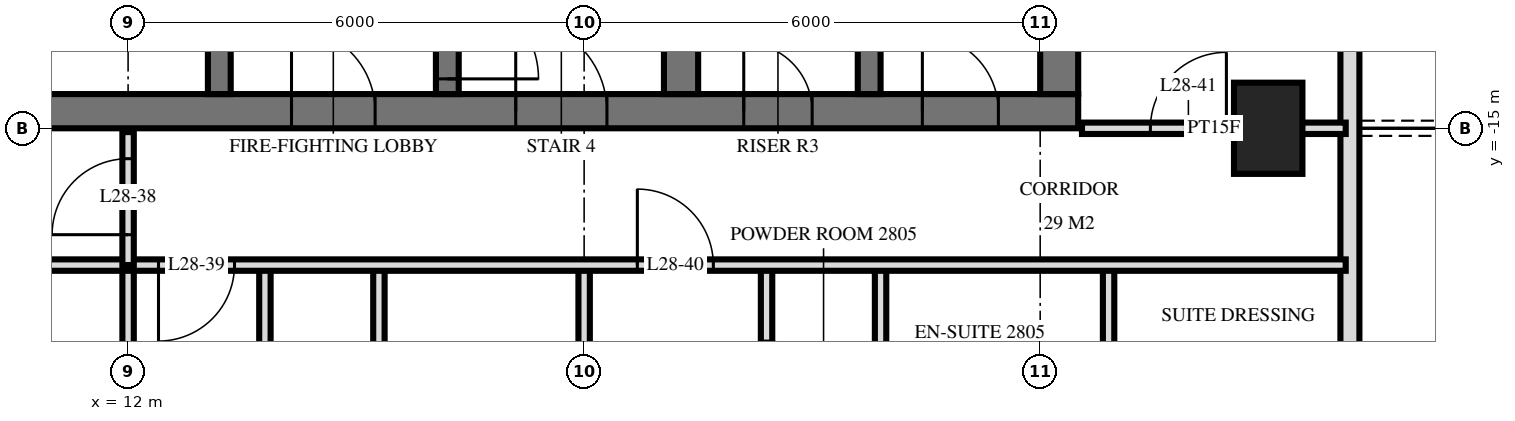
"""IFC4 building model, lengths in metres.
Left out: names, types, materials, properties, quantities, classifications, styles, units other than length and angle.
Written with IfcOpenShell. Run it as: python <this file> out.ifc"""

import sys

from ifc_helpers import new_model, si_unit, direction, frame, frame_2d, origin, origin_2d, place, context, subcontext, project, spatial, rectangle, extrude, element, fill, save


model = new_model("IFC4")
c1 = context("Model", 3, precision=1e-05, world=origin(), true_north=direction((0.0, 1.0)))
c2 = subcontext(c1, "Body", "Model", "MODEL_VIEW")
j1 = project(units=[si_unit("LENGTHUNIT", "METRE"), si_unit("PLANEANGLEUNIT", "RADIAN")], contexts=[c1])
p1 = place(None, origin())
s1 = spatial("IfcSite", under=j1, at=p1, CompositionType="ELEMENT")
p2 = place(p1, origin())
s2 = spatial("IfcBuilding", under=s1, at=p2, CompositionType="ELEMENT")
p3 = place(p2, frame((0.0, 0.0, 112.8)))
s3 = spatial("IfcBuildingStorey", under=s2, at=p3, CompositionType="ELEMENT", Elevation=112.8)
p4 = place(p3, frame((27.0, -15.0, -0.28), z_axis=(0.0, 0.0, 1.0), x_axis=(0.0, 1.0, 0.0)))
e1 = element("IfcColumn", 1, at=p4, inside=s3, PredefinedType="COLUMN", context=c2, shape_type="SweptSolid", body=[
    extrude(rectangle(XDim=1.2, YDim=0.9, at=origin_2d()), origin(), (0.0, 0.0, 1.0), 3.88),
])
p5 = place(p3, frame((10.0, -14.775, 0.0), z_axis=(0.0, 0.0, 1.0), x_axis=(1.0, 0.0, 0.0)))
e2 = element("IfcWall", 2, at=p5, inside=s3, PredefinedType="SHEAR", context=c2, shape_type="SweptSolid", body=[
    extrude(rectangle(XDim=14.5, YDim=0.45, at=frame_2d((7.25, 0.0))), origin(), (0.0, 0.0, 1.0), 3.6),
])
p6 = place(p5, frame((7.1, 0.0, 0.0)))
e3 = element("IfcOpeningElement", 3, at=p6, cuts=e2, PredefinedType="OPENING", context=c2, shape_type="SweptSolid", body=[
    extrude(rectangle(XDim=1.2, YDim=2.1, at=frame_2d((0.6, 1.05))), frame((0.0, 0.235, 0.0), z_axis=(0.0, -1.0, 0.0), x_axis=(1.0, 0.0, 0.0)), (0.0, 0.0, 1.0), 0.47),
])
p7 = place(p5, frame((4.15, 0.0, 0.0)))
e4 = element("IfcOpeningElement", 4, at=p7, cuts=e2, PredefinedType="OPENING", context=c2, shape_type="SweptSolid", body=[
    extrude(rectangle(XDim=1.1, YDim=2.1, at=frame_2d((0.55, 1.05))), frame((0.0, 0.235, 0.0), z_axis=(0.0, -1.0, 0.0), x_axis=(1.0, 0.0, 0.0)), (0.0, 0.0, 1.0), 0.47),
])
p8 = place(p5, frame((10.1, 0.0, 0.0)))
e5 = element("IfcOpeningElement", 5, at=p8, cuts=e2, PredefinedType="OPENING", context=c2, shape_type="SweptSolid", body=[
    extrude(rectangle(XDim=0.9, YDim=2.1, at=frame_2d((0.45, 1.05))), frame((0.0, 0.235, 0.0), z_axis=(0.0, -1.0, 0.0), x_axis=(1.0, 0.0, 0.0)), (0.0, 0.0, 1.0), 0.47),
])
p9 = place(p5, frame((12.45, 0.0, 0.0)))
e6 = element("IfcOpeningElement", 6, at=p9, cuts=e2, PredefinedType="OPENING", context=c2, shape_type="SweptSolid", body=[
    extrude(rectangle(XDim=1.0, YDim=2.1, at=frame_2d((0.5, 1.05))), frame((0.0, 0.235, 0.0), z_axis=(0.0, -1.0, 0.0), x_axis=(1.0, 0.0, 0.0)), (0.0, 0.0, 1.0), 0.47),
])
p10 = place(p3, frame((24.25, -14.55, 0.0), z_axis=(0.0, 0.0, 1.0), x_axis=(0.0, 1.0, 0.0)))
e7 = element("IfcWall", 7, at=p10, inside=s3, PredefinedType="SHEAR", context=c2, shape_type="SweptSolid", body=[
    extrude(rectangle(XDim=14.1, YDim=0.5, at=frame_2d((7.05, 0.0))), origin(), (0.0, 0.0, 1.0), 3.6),
])
p11 = place(p3, frame((13.2, -14.55, 0.0), z_axis=(0.0, 0.0, 1.0), x_axis=(0.0, 1.0, 0.0)))
e8 = element("IfcWall", 8, at=p11, inside=s3, PredefinedType="SHEAR", context=c2, shape_type="SweptSolid", body=[
    extrude(rectangle(XDim=5.4, YDim=0.3, at=frame_2d((2.7, 0.0))), origin(), (0.0, 0.0, 1.0), 3.6),
])
p12 = place(p11, frame((4.0, 0.0, 0.0)))
e9 = element("IfcOpeningElement", 9, at=p12, cuts=e8, PredefinedType="OPENING", context=c2, shape_type="SweptSolid", body=[
    extrude(rectangle(XDim=1.2, YDim=2.1, at=frame_2d((0.6, 1.05))), frame((0.0, 0.16, 0.0), z_axis=(0.0, -1.0, 0.0), x_axis=(1.0, 0.0, 0.0)), (0.0, 0.0, 1.0), 0.32),
])
p13 = place(p3, frame((16.2, -14.55, 0.0), z_axis=(0.0, 0.0, 1.0), x_axis=(0.0, 1.0, 0.0)))
e10 = element("IfcWall", 10, at=p13, inside=s3, PredefinedType="SHEAR", context=c2, shape_type="SweptSolid", body=[
    extrude(rectangle(XDim=5.4, YDim=0.3, at=frame_2d((2.7, 0.0))), origin(), (0.0, 0.0, 1.0), 3.6),
])
p14 = place(p13, frame((0.2, 0.0, 0.0)))
e11 = element("IfcOpeningElement", 11, at=p14, cuts=e10, PredefinedType="OPENING", context=c2, shape_type="SweptSolid", body=[
    extrude(rectangle(XDim=1.2, YDim=2.1, at=frame_2d((0.6, 1.05))), frame((0.0, 0.16, 0.0), z_axis=(0.0, -1.0, 0.0), x_axis=(1.0, 0.0, 0.0)), (0.0, 0.0, 1.0), 0.32),
])
p15 = place(p3, frame((19.275, -14.55, 0.0), z_axis=(0.0, 0.0, 1.0), x_axis=(0.0, 1.0, 0.0)))
e12 = element("IfcWall", 12, at=p15, inside=s3, PredefinedType="SHEAR", context=c2, shape_type="SweptSolid", body=[
    extrude(rectangle(XDim=5.4, YDim=0.45, at=frame_2d((2.7, 0.0))), origin(), (0.0, 0.0, 1.0), 3.6),
])
p16 = place(p3, frame((21.75, -14.55, 0.0), z_axis=(0.0, 0.0, 1.0), x_axis=(0.0, 1.0, 0.0)))
e13 = element("IfcWall", 13, at=p16, inside=s3, PredefinedType="SHEAR", context=c2, shape_type="SweptSolid", body=[
    extrude(rectangle(XDim=5.4, YDim=0.3, at=frame_2d((2.7, 0.0))), origin(), (0.0, 0.0, 1.0), 3.6),
])
p17 = place(p3, frame((28.075, -29.275, 0.0), z_axis=(0.0, 0.0, 1.0), x_axis=(0.0, 1.0, 0.0)))
e14 = element("IfcWall", 14, at=p17, inside=s3, PredefinedType="SOLIDWALL", context=c2, shape_type="SweptSolid", body=[
    extrude(rectangle(XDim=25.951, YDim=0.25, at=frame_2d((12.975, 0.0))), origin(), (0.0, 0.0, 1.0), 3.32),
])
p18 = place(p17, frame((0.575, 0.0, 0.0)))
e15 = element("IfcOpeningElement", 15, at=p18, cuts=e14, PredefinedType="OPENING", context=c2, shape_type="SweptSolid", body=[
    extrude(rectangle(XDim=1.8, YDim=2.4, at=frame_2d((0.9, 1.2))), frame((0.0, 0.135, 0.0), z_axis=(0.0, -1.0, 0.0), x_axis=(1.0, 0.0, 0.0)), (0.0, 0.0, 1.0), 0.27),
])
p19 = place(p17, frame((3.325, 0.0, 0.3)))
e16 = element("IfcOpeningElement", 16, at=p19, cuts=e14, PredefinedType="OPENING", context=c2, shape_type="SweptSolid", body=[
    extrude(rectangle(XDim=1.8, YDim=2.1, at=frame_2d((0.9, 1.05))), frame((0.0, 0.135, 0.0), z_axis=(0.0, -1.0, 0.0), x_axis=(1.0, 0.0, 0.0)), (0.0, 0.0, 1.0), 0.27),
])
p20 = place(p17, frame((6.075, 0.0, 0.0)))
e17 = element("IfcOpeningElement", 17, at=p20, cuts=e14, PredefinedType="OPENING", context=c2, shape_type="SweptSolid", body=[
    extrude(rectangle(XDim=1.8, YDim=2.4, at=frame_2d((0.9, 1.2))), frame((0.0, 0.135, 0.0), z_axis=(0.0, -1.0, 0.0), x_axis=(1.0, 0.0, 0.0)), (0.0, 0.0, 1.0), 0.27),
])
p21 = place(p17, frame((17.125, 0.0, 0.0)))
e18 = element("IfcOpeningElement", 18, at=p21, cuts=e14, PredefinedType="OPENING", context=c2, shape_type="SweptSolid", body=[
    extrude(rectangle(XDim=1.8, YDim=2.4, at=frame_2d((0.9, 1.2))), frame((0.0, 0.135, 0.0), z_axis=(0.0, -1.0, 0.0), x_axis=(1.0, 0.0, 0.0)), (0.0, 0.0, 1.0), 0.27),
])
p22 = place(p3, frame((24.9, -19.8, 0.0), z_axis=(0.0, 0.0, 1.0), x_axis=(0.0, 1.0, 0.0)))
e19 = element("IfcWall", 19, at=p22, inside=s3, PredefinedType="PARTITIONING", context=c2, shape_type="SweptSolid", body=[
    extrude(rectangle(XDim=3.0, YDim=0.15, at=frame_2d((1.5, 0.0))), origin(), (0.0, 0.0, 1.0), 3.32),
])
p23 = place(p3, frame((21.9, -19.8, 0.0), z_axis=(0.0, 0.0, 1.0), x_axis=(0.0, 1.0, 0.0)))
e20 = element("IfcWall", 20, at=p23, inside=s3, PredefinedType="PLUMBINGWALL", context=c2, shape_type="SweptSolid", body=[
    extrude(rectangle(XDim=3.0, YDim=0.15, at=frame_2d((1.5, 0.0))), origin(), (0.0, 0.0, 1.0), 3.32),
])
p24 = place(p3, frame((20.4, -19.8, 0.0), z_axis=(0.0, 0.0, 1.0), x_axis=(0.0, 1.0, 0.0)))
e21 = element("IfcWall", 21, at=p24, inside=s3, PredefinedType="PARTITIONING", context=c2, shape_type="SweptSolid", body=[
    extrude(rectangle(XDim=3.0, YDim=0.15, at=frame_2d((1.5, 0.0))), origin(), (0.0, 0.0, 1.0), 3.32),
])
p25 = place(p24, frame((1.0, 0.0, 0.0)))
e22 = element("IfcOpeningElement", 22, at=p25, cuts=e21, PredefinedType="OPENING", context=c2, shape_type="SweptSolid", body=[
    extrude(rectangle(XDim=1.0, YDim=2.1, at=frame_2d((0.5, 1.05))), frame((0.0, 0.085, 0.0), z_axis=(0.0, -1.0, 0.0), x_axis=(1.0, 0.0, 0.0)), (0.0, 0.0, 1.0), 0.17),
])
p26 = place(p3, frame((18.0, -19.8, 0.0), z_axis=(0.0, 0.0, 1.0), x_axis=(0.0, 1.0, 0.0)))
e23 = element("IfcWall", 23, at=p26, inside=s3, PredefinedType="PARTITIONING", context=c2, shape_type="SweptSolid", body=[
    extrude(rectangle(XDim=3.0, YDim=0.15, at=frame_2d((1.5, 0.0))), origin(), (0.0, 0.0, 1.0), 3.32),
])
p27 = place(p3, frame((15.3, -20.6, 0.0), z_axis=(0.0, 0.0, 1.0), x_axis=(0.0, 1.0, 0.0)))
e24 = element("IfcWall", 24, at=p27, inside=s3, PredefinedType="PARTITIONING", context=c2, shape_type="SweptSolid", body=[
    extrude(rectangle(XDim=3.8, YDim=0.15, at=frame_2d((1.9, 0.0))), origin(), (0.0, 0.0, 1.0), 3.32),
])
p28 = place(p3, frame((13.8, -20.6, 0.0), z_axis=(0.0, 0.0, 1.0), x_axis=(0.0, 1.0, 0.0)))
e25 = element("IfcWall", 25, at=p28, inside=s3, PredefinedType="PARTITIONING", context=c2, shape_type="SweptSolid", body=[
    extrude(rectangle(XDim=3.8, YDim=0.15, at=frame_2d((1.9, 0.0))), origin(), (0.0, 0.0, 1.0), 3.32),
])
p29 = place(p28, frame((1.45, 0.0, 0.0)))
e26 = element("IfcOpeningElement", 26, at=p29, cuts=e25, PredefinedType="OPENING", context=c2, shape_type="SweptSolid", body=[
    extrude(rectangle(XDim=0.9, YDim=2.1, at=frame_2d((0.45, 1.05))), frame((0.0, 0.085, 0.0), z_axis=(0.0, -1.0, 0.0), x_axis=(1.0, 0.0, 0.0)), (0.0, 0.0, 1.0), 0.17),
])
p30 = place(p3, frame((12.0, -16.8, 0.0), z_axis=(0.0, 0.0, 1.0), x_axis=(0.0, 1.0, 0.0)))
e27 = element("IfcWall", 27, at=p30, inside=s3, PredefinedType="PARTITIONING", context=c2, shape_type="SweptSolid", body=[
    extrude(rectangle(XDim=1.75, YDim=0.15, at=frame_2d((0.875, 0.0))), origin(), (0.0, 0.0, 1.0), 3.32),
])
p31 = place(p30, frame((0.4, 0.0, 0.0)))
e28 = element("IfcOpeningElement", 28, at=p31, cuts=e27, PredefinedType="OPENING", context=c2, shape_type="SweptSolid", body=[
    extrude(rectangle(XDim=1.0, YDim=2.1, at=frame_2d((0.5, 1.05))), frame((0.0, 0.085, 0.0), z_axis=(0.0, -1.0, 0.0), x_axis=(1.0, 0.0, 0.0)), (0.0, 0.0, 1.0), 0.17),
])
p32 = place(p3, frame((12.0, -33.62, 0.0), z_axis=(0.0, 0.0, 1.0), x_axis=(0.0, 1.0, 0.0)))
e29 = element("IfcWall", 29, at=p32, inside=s3, PredefinedType="PARTITIONING", context=c2, shape_type="SweptSolid", body=[
    extrude(rectangle(XDim=16.82, YDim=0.15, at=frame_2d((8.41, 0.0))), origin(), (0.0, 0.0, 1.0), 3.32),
])
p33 = place(p3, frame((-28.02, -16.8, 0.0), z_axis=(0.0, 0.0, 1.0), x_axis=(1.0, 0.0, 0.0)))
e30 = element("IfcWall", 30, at=p33, inside=s3, PredefinedType="PARTITIONING", context=c2, shape_type="SweptSolid", body=[
    extrude(rectangle(XDim=56.04, YDim=0.15, at=frame_2d((28.02, 0.0))), origin(), (0.0, 0.0, 1.0), 3.32),
])
p34 = place(p33, frame((13.17, 0.0, 0.0)))
e31 = element("IfcOpeningElement", 31, at=p34, cuts=e30, PredefinedType="OPENING", context=c2, shape_type="SweptSolid", body=[
    extrude(rectangle(XDim=1.0, YDim=2.1, at=frame_2d((0.5, 1.05))), frame((0.0, 0.085, 0.0), z_axis=(0.0, -1.0, 0.0), x_axis=(1.0, 0.0, 0.0)), (0.0, 0.0, 1.0), 0.17),
])
p35 = place(p33, frame((11.87, 0.0, 0.0)))
e32 = element("IfcOpeningElement", 32, at=p35, cuts=e30, PredefinedType="OPENING", context=c2, shape_type="SweptSolid", body=[
    extrude(rectangle(XDim=1.0, YDim=2.1, at=frame_2d((0.5, 1.05))), frame((0.0, 0.085, 0.0), z_axis=(0.0, -1.0, 0.0), x_axis=(1.0, 0.0, 0.0)), (0.0, 0.0, 1.0), 0.17),
])
p36 = place(p33, frame((8.32, 0.0, 0.0)))
e33 = element("IfcOpeningElement", 33, at=p36, cuts=e30, PredefinedType="OPENING", context=c2, shape_type="SweptSolid", body=[
    extrude(rectangle(XDim=1.0, YDim=2.1, at=frame_2d((0.5, 1.05))), frame((0.0, 0.085, 0.0), z_axis=(0.0, -1.0, 0.0), x_axis=(1.0, 0.0, 0.0)), (0.0, 0.0, 1.0), 0.17),
])
p37 = place(p33, frame((40.42, 0.0, 0.0)))
e34 = element("IfcOpeningElement", 34, at=p37, cuts=e30, PredefinedType="OPENING", context=c2, shape_type="SweptSolid", body=[
    extrude(rectangle(XDim=1.0, YDim=2.1, at=frame_2d((0.5, 1.05))), frame((0.0, 0.085, 0.0), z_axis=(0.0, -1.0, 0.0), x_axis=(1.0, 0.0, 0.0)), (0.0, 0.0, 1.0), 0.17),
])
p38 = place(p33, frame((46.72, 0.0, 0.0)))
e35 = element("IfcOpeningElement", 35, at=p38, cuts=e30, PredefinedType="OPENING", context=c2, shape_type="SweptSolid", body=[
    extrude(rectangle(XDim=1.0, YDim=2.1, at=frame_2d((0.5, 1.05))), frame((0.0, 0.085, 0.0), z_axis=(0.0, -1.0, 0.0), x_axis=(1.0, 0.0, 0.0)), (0.0, 0.0, 1.0), 0.17),
])
p39 = place(p33, frame((21.52, 0.0, 0.0)))
e36 = element("IfcOpeningElement", 36, at=p39, cuts=e30, PredefinedType="OPENING", context=c2, shape_type="SweptSolid", body=[
    extrude(rectangle(XDim=1.0, YDim=2.1, at=frame_2d((0.5, 1.05))), frame((0.0, 0.085, 0.0), z_axis=(0.0, -1.0, 0.0), x_axis=(1.0, 0.0, 0.0)), (0.0, 0.0, 1.0), 0.17),
])
p40 = place(p33, frame((30.52, 0.0, 0.0)))
e37 = element("IfcOpeningElement", 37, at=p40, cuts=e30, PredefinedType="OPENING", context=c2, shape_type="SweptSolid", body=[
    extrude(rectangle(XDim=1.0, YDim=2.1, at=frame_2d((0.5, 1.05))), frame((0.0, 0.085, 0.0), z_axis=(0.0, -1.0, 0.0), x_axis=(1.0, 0.0, 0.0)), (0.0, 0.0, 1.0), 0.17),
])
p41 = place(p33, frame((36.52, 0.0, 0.0)))
e38 = element("IfcOpeningElement", 38, at=p41, cuts=e30, PredefinedType="OPENING", context=c2, shape_type="SweptSolid", body=[
    extrude(rectangle(XDim=1.0, YDim=2.1, at=frame_2d((0.5, 1.05))), frame((0.0, 0.085, 0.0), z_axis=(0.0, -1.0, 0.0), x_axis=(1.0, 0.0, 0.0)), (0.0, 0.0, 1.0), 0.17),
])
p42 = place(p3, frame((24.55, -15.0, 0.0), z_axis=(0.0, 0.0, 1.0), x_axis=(1.0, 0.0, 0.0)))
e39 = element("IfcWall", 39, at=p42, inside=s3, PredefinedType="PARTITIONING", context=c2, shape_type="SweptSolid", body=[
    extrude(rectangle(XDim=3.47, YDim=0.15, at=frame_2d((1.735, 0.0))), origin(), (0.0, 0.0, 1.0), 3.32),
])
p43 = place(p42, frame((0.9, 0.0, 0.0)))
e40 = element("IfcOpeningElement", 40, at=p43, cuts=e39, PredefinedType="OPENING", context=c2, shape_type="SweptSolid", body=[
    extrude(rectangle(XDim=1.0, YDim=2.1, at=frame_2d((0.5, 1.05))), frame((0.0, 0.085, 0.0), z_axis=(0.0, -1.0, 0.0), x_axis=(1.0, 0.0, 0.0)), (0.0, 0.0, 1.0), 0.17),
])
p44 = place(p6, origin())
e41 = element("IfcDoor", 41, at=p44, inside=s3, OperationType="SINGLE_SWING_RIGHT", PredefinedType="DOOR", context=c2, shape_type="SweptSolid", body=[
    extrude(rectangle(XDim=1.2, YDim=2.1, at=frame_2d((0.6, 1.05))), frame((0.0, 0.025, 0.0), z_axis=(0.0, -1.0, 0.0), x_axis=(1.0, 0.0, 0.0)), (0.0, 0.0, 1.0), 0.05),
])
fill(e3, e41)
p45 = place(p7, origin())
e42 = element("IfcDoor", 42, at=p45, inside=s3, OperationType="SINGLE_SWING_RIGHT", PredefinedType="DOOR", context=c2, shape_type="SweptSolid", body=[
    extrude(rectangle(XDim=1.1, YDim=2.1, at=frame_2d((0.55, 1.05))), frame((0.0, 0.025, 0.0), z_axis=(0.0, -1.0, 0.0), x_axis=(1.0, 0.0, 0.0)), (0.0, 0.0, 1.0), 0.05),
])
fill(e4, e42)
p46 = place(p8, origin())
e43 = element("IfcDoor", 43, at=p46, inside=s3, OperationType="SINGLE_SWING_RIGHT", PredefinedType="DOOR", context=c2, shape_type="SweptSolid", body=[
    extrude(rectangle(XDim=0.9, YDim=2.1, at=frame_2d((0.45, 1.05))), frame((0.0, 0.025, 0.0), z_axis=(0.0, -1.0, 0.0), x_axis=(1.0, 0.0, 0.0)), (0.0, 0.0, 1.0), 0.05),
])
fill(e5, e43)
p47 = place(p9, origin())
e44 = element("IfcDoor", 44, at=p47, inside=s3, OperationType="SINGLE_SWING_RIGHT", PredefinedType="DOOR", context=c2, shape_type="SweptSolid", body=[
    extrude(rectangle(XDim=1.0, YDim=2.1, at=frame_2d((0.5, 1.05))), frame((0.0, 0.025, 0.0), z_axis=(0.0, -1.0, 0.0), x_axis=(1.0, 0.0, 0.0)), (0.0, 0.0, 1.0), 0.05),
])
fill(e6, e44)
p48 = place(p14, frame((0.6, 0.0, 0.0), z_axis=(0.0, 0.0, 1.0), x_axis=(-1.0, 0.0, 0.0)))
e45 = element("IfcDoor", 45, at=p48, inside=s3, OperationType="SINGLE_SWING_LEFT", PredefinedType="DOOR", context=c2, shape_type="SweptSolid", body=[
    extrude(rectangle(XDim=1.2, YDim=2.1, at=frame_2d((0.0, 1.05))), frame((0.0, -0.025, 0.0), z_axis=(0.0, 1.0, 0.0), x_axis=(-1.0, 0.0, 0.0)), (0.0, 0.0, 1.0), 0.05),
])
fill(e11, e45)
p49 = place(p31, origin())
e46 = element("IfcDoor", 46, at=p49, inside=s3, OperationType="SINGLE_SWING_RIGHT", PredefinedType="DOOR", context=c2, shape_type="SweptSolid", body=[
    extrude(rectangle(XDim=1.0, YDim=2.1, at=frame_2d((0.5, 1.05))), frame((0.0, 0.025, 0.0), z_axis=(0.0, -1.0, 0.0), x_axis=(1.0, 0.0, 0.0)), (0.0, 0.0, 1.0), 0.05),
])
fill(e28, e46)
p50 = place(p37, frame((0.5, 0.0, 0.0), z_axis=(0.0, 0.0, 1.0), x_axis=(-1.0, 0.0, 0.0)))
e47 = element("IfcDoor", 47, at=p50, inside=s3, OperationType="SINGLE_SWING_LEFT", PredefinedType="DOOR", context=c2, shape_type="SweptSolid", body=[
    extrude(rectangle(XDim=1.0, YDim=2.1, at=frame_2d((0.0, 1.05))), frame((0.0, -0.025, 0.0), z_axis=(0.0, 1.0, 0.0), x_axis=(-1.0, 0.0, 0.0)), (0.0, 0.0, 1.0), 0.05),
])
fill(e34, e47)
p51 = place(p38, origin())
e48 = element("IfcDoor", 48, at=p51, inside=s3, OperationType="SINGLE_SWING_RIGHT", PredefinedType="DOOR", context=c2, shape_type="SweptSolid", body=[
    extrude(rectangle(XDim=1.0, YDim=2.1, at=frame_2d((0.5, 1.05))), frame((0.0, 0.025, 0.0), z_axis=(0.0, -1.0, 0.0), x_axis=(1.0, 0.0, 0.0)), (0.0, 0.0, 1.0), 0.05),
])
fill(e35, e48)
p52 = place(p43, origin())
e49 = element("IfcDoor", 49, at=p52, inside=s3, OperationType="SINGLE_SWING_LEFT", PredefinedType="DOOR", context=c2, shape_type="SweptSolid", body=[
    extrude(rectangle(XDim=1.0, YDim=2.1, at=frame_2d((0.5, 1.05))), frame((0.0, 0.025, 0.0), z_axis=(0.0, -1.0, 0.0), x_axis=(1.0, 0.0, 0.0)), (0.0, 0.0, 1.0), 0.05),
])
fill(e40, e49)
save(model, sys.argv[1])
